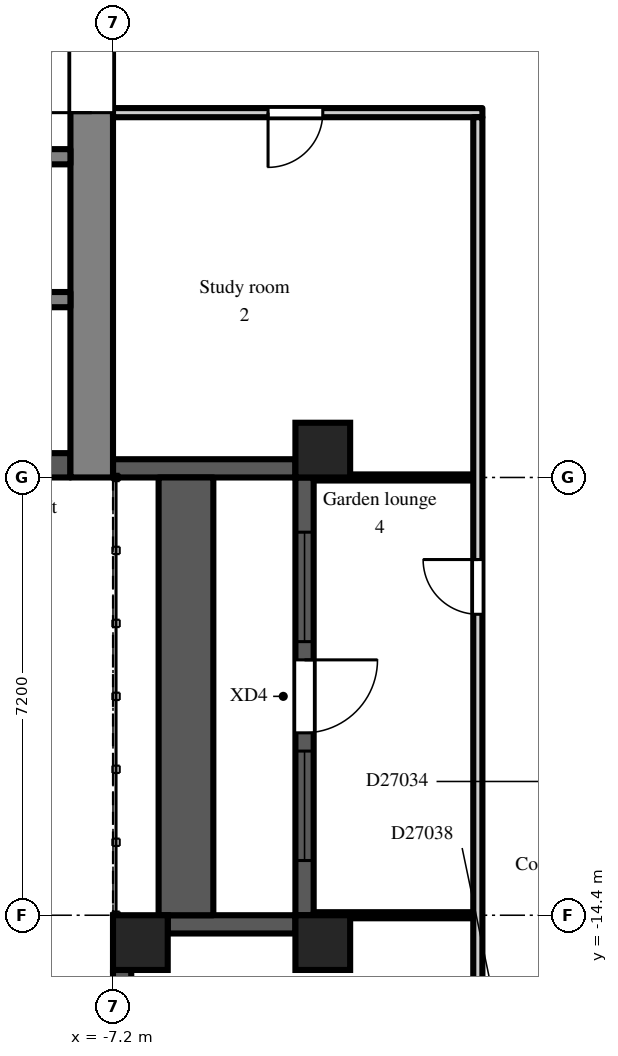
"""IFC4 building model, lengths in metres.
Left out: names, types, materials, properties, quantities, classifications, styles, units other than length and angle.
Written with IfcOpenShell. Run it as: python <this file> out.ifc"""

import sys

from ifc_helpers import new_model, si_unit, direction, frame, frame_2d, origin, origin_2d, place, context, subcontext, project, spatial, rectangle, extrude, element, fill, save


model = new_model("IFC4")
c1 = context("Model", 3, precision=1e-05, world=origin(), true_north=direction((0.0, 1.0)))
c2 = subcontext(c1, "Body", "Model", "MODEL_VIEW")
j1 = project(units=[si_unit("LENGTHUNIT", "METRE"), si_unit("PLANEANGLEUNIT", "RADIAN")], contexts=[c1])
p1 = place(None, origin())
s1 = spatial("IfcSite", under=j1, at=p1, CompositionType="ELEMENT")
p2 = place(p1, origin())
s2 = spatial("IfcBuilding", under=s1, at=p2, CompositionType="ELEMENT")
p3 = place(p2, frame((0.0, 0.0, 188.7)))
s3 = spatial("IfcBuildingStorey", under=s2, at=p3, CompositionType="ELEMENT", Elevation=188.7)
for number, where, z_axis, x_axis in (
    (1, (-6.75, -14.85, 0.0), (0.0, 0.0, 1.0), (1.0, 0.0, 0.0)),
    (2, (-3.75, -14.85, 0.0), (0.0, 0.0, 1.0), (1.0, 0.0, 0.0)),
    (3, (-3.75, -6.75, 0.0), (0.0, 0.0, 1.0), (1.0, 0.0, 0.0)),
):
    element("IfcColumn", number, at=place(p3, frame(where, z_axis=z_axis, x_axis=x_axis)), inside=s3, PredefinedType="COLUMN", context=c2, shape_type="SweptSolid", body=[
        extrude(rectangle(XDim=0.9, YDim=0.9, at=origin_2d()), origin(), (0.0, 0.0, 1.0), 3.0),
    ])
p4 = place(p3, frame((-7.2, -7.05, 0.0), z_axis=(0.0, 0.0, 1.0), x_axis=(1.0, 0.0, 0.0)))
e4 = element("IfcWall", 4, at=p4, inside=s3, PredefinedType="SOLIDWALL", context=c2, shape_type="SweptSolid", body=[
    extrude(rectangle(XDim=3.0, YDim=0.3, at=frame_2d((1.5, 0.0))), origin(), (0.0, 0.0, 1.0), 2.2),
])
p5 = place(p3, frame((-4.05, -7.2, 0.0), z_axis=(0.0, 0.0, 1.0), x_axis=(0.0, -1.0, 0.0)))
e5 = element("IfcWall", 5, at=p5, inside=s3, PredefinedType="SOLIDWALL", context=c2, shape_type="SweptSolid", body=[
    extrude(rectangle(XDim=7.2, YDim=0.3, at=frame_2d((3.6, 0.0))), origin(), (0.0, 0.0, 1.0), 2.2),
])
p6 = place(p5, frame((3.0, 0.0, 0.0)))
e6 = element("IfcOpeningElement", 6, at=p6, cuts=e5, PredefinedType="OPENING", context=c2, shape_type="SweptSolid", body=[
    extrude(rectangle(XDim=1.2, YDim=2.05, at=frame_2d((0.6, 1.025))), frame((0.0, 0.16, 0.0), z_axis=(0.0, -1.0, 0.0), x_axis=(1.0, 0.0, 0.0)), (0.0, 0.0, 1.0), 0.32),
])
p7 = place(p5, frame((0.9, 0.0, 0.2)))
e7 = element("IfcOpeningElement", 7, at=p7, cuts=e5, PredefinedType="OPENING", context=c2, shape_type="SweptSolid", body=[
    extrude(rectangle(XDim=1.8, YDim=1.85, at=frame_2d((0.9, 0.925))), frame((0.0, 0.16, 0.0), z_axis=(0.0, -1.0, 0.0), x_axis=(1.0, 0.0, 0.0)), (0.0, 0.0, 1.0), 0.32),
])
p8 = place(p5, frame((4.5, 0.0, 0.2)))
e8 = element("IfcOpeningElement", 8, at=p8, cuts=e5, PredefinedType="OPENING", context=c2, shape_type="SweptSolid", body=[
    extrude(rectangle(XDim=1.8, YDim=1.85, at=frame_2d((0.9, 0.925))), frame((0.0, 0.16, 0.0), z_axis=(0.0, -1.0, 0.0), x_axis=(1.0, 0.0, 0.0)), (0.0, 0.0, 1.0), 0.32),
])
p9 = place(p3, frame((-4.2, -14.55, 0.0), z_axis=(0.0, 0.0, 1.0), x_axis=(-1.0, 0.0, 0.0)))
e9 = element("IfcWall", 9, at=p9, inside=s3, PredefinedType="SOLIDWALL", context=c2, shape_type="SweptSolid", body=[
    extrude(rectangle(XDim=2.1, YDim=0.3, at=frame_2d((1.05, 0.0))), origin(), (0.0, 0.0, 1.0), 2.2),
])
p10 = place(p3, frame((-7.05, -15.3, 0.0), z_axis=(0.0, 0.0, 1.0), x_axis=(0.0, -1.0, 0.0)))
e10 = element("IfcWall", 10, at=p10, inside=s3, PredefinedType="SOLIDWALL", context=c2, shape_type="SweptSolid", body=[
    extrude(rectangle(XDim=1.8, YDim=0.3, at=frame_2d((0.9, 0.0))), origin(), (0.0, 0.0, 1.0), 2.2),
])
p11 = place(p10, frame((0.3, 0.0, 0.2)))
e11 = element("IfcOpeningElement", 11, at=p11, cuts=e10, PredefinedType="OPENING", context=c2, shape_type="SweptSolid", body=[
    extrude(rectangle(XDim=1.2, YDim=1.85, at=frame_2d((0.6, 0.925))), frame((0.0, 0.16, 0.0), z_axis=(0.0, -1.0, 0.0), x_axis=(1.0, 0.0, 0.0)), (0.0, 0.0, 1.0), 0.32),
])
p12 = place(p3, frame((-6.0, -14.4, 0.0), z_axis=(0.0, 0.0, 1.0), x_axis=(0.0, 1.0, 0.0)))
e12 = element("IfcWall", 12, at=p12, inside=s3, PredefinedType="PARAPET", context=c2, shape_type="SweptSolid", body=[
    extrude(rectangle(XDim=7.2, YDim=0.9, at=frame_2d((3.6, 0.0))), origin(), (0.0, 0.0, 1.0), 0.8),
])
p13 = place(p3, frame((-7.55, -7.2, 0.0), z_axis=(0.0, 0.0, 1.0), x_axis=(0.0, 1.0, 0.0)))
e13 = element("IfcWall", 13, at=p13, inside=s3, PredefinedType="SHEAR", context=c2, shape_type="SweptSolid", body=[
    extrude(rectangle(XDim=14.4, YDim=0.7, at=frame_2d((7.2, 0.0))), origin(), (0.0, 0.0, 1.0), 2.6),
])
p14 = place(p13, frame((6.0, 0.0, 0.0)))
e14 = element("IfcOpeningElement", 14, at=p14, cuts=e13, PredefinedType="OPENING", context=c2, shape_type="SweptSolid", body=[
    extrude(rectangle(XDim=2.4, YDim=2.2, at=frame_2d((1.2, 1.1))), frame((0.0, 0.36, 0.0), z_axis=(0.0, -1.0, 0.0), x_axis=(1.0, 0.0, 0.0)), (0.0, 0.0, 1.0), 0.72),
])
p15 = place(p3, frame((-7.9, -7.0, 0.0), z_axis=(0.0, 0.0, 1.0), x_axis=(-1.0, 0.0, 0.0)))
e15 = element("IfcWall", 15, at=p15, inside=s3, PredefinedType="SHEAR", context=c2, shape_type="SweptSolid", body=[
    extrude(rectangle(XDim=12.95, YDim=0.4, at=frame_2d((6.475, 0.0))), origin(), (0.0, 0.0, 1.0), 2.6),
])
p16 = place(p3, frame((-7.9, -1.925, 0.0), z_axis=(0.0, 0.0, 1.0), x_axis=(-1.0, 0.0, 0.0)))
e16 = element("IfcWall", 16, at=p16, inside=s3, PredefinedType="SHEAR", context=c2, shape_type="SweptSolid", body=[
    extrude(rectangle(XDim=12.95, YDim=0.25, at=frame_2d((6.475, 0.0))), origin(), (0.0, 0.0, 1.0), 2.6),
])
p17 = place(p16, frame((0.525, 0.0, 0.0)))
e17 = element("IfcOpeningElement", 17, at=p17, cuts=e16, PredefinedType="OPENING", context=c2, shape_type="SweptSolid", body=[
    extrude(rectangle(XDim=0.9, YDim=2.1, at=frame_2d((0.45, 1.05))), frame((0.0, 0.135, 0.0), z_axis=(0.0, -1.0, 0.0), x_axis=(1.0, 0.0, 0.0)), (0.0, 0.0, 1.0), 0.27),
])
p18 = place(p16, frame((2.625, 0.0, 0.0)))
e18 = element("IfcOpeningElement", 18, at=p18, cuts=e16, PredefinedType="OPENING", context=c2, shape_type="SweptSolid", body=[
    extrude(rectangle(XDim=1.1, YDim=2.1, at=frame_2d((0.55, 1.05))), frame((0.0, 0.135, 0.0), z_axis=(0.0, -1.0, 0.0), x_axis=(1.0, 0.0, 0.0)), (0.0, 0.0, 1.0), 0.27),
])
p19 = place(p16, frame((8.225, 0.0, 0.0)))
e19 = element("IfcOpeningElement", 19, at=p19, cuts=e16, PredefinedType="OPENING", context=c2, shape_type="SweptSolid", body=[
    extrude(rectangle(XDim=0.9, YDim=2.1, at=frame_2d((0.45, 1.05))), frame((0.0, 0.135, 0.0), z_axis=(0.0, -1.0, 0.0), x_axis=(1.0, 0.0, 0.0)), (0.0, 0.0, 1.0), 0.27),
])
p20 = place(p3, frame((-7.9, -4.275, 0.0), z_axis=(0.0, 0.0, 1.0), x_axis=(-1.0, 0.0, 0.0)))
e20 = element("IfcWall", 20, at=p20, inside=s3, PredefinedType="SHEAR", context=c2, shape_type="SweptSolid", body=[
    extrude(rectangle(XDim=1.95, YDim=0.25, at=frame_2d((0.975, 0.0))), origin(), (0.0, 0.0, 1.0), 2.6),
])
p21 = place(p3, frame((-7.2, -1.2, 0.0), z_axis=(0.0, 0.0, 1.0), x_axis=(1.0, 0.0, 0.0)))
e21 = element("IfcWall", 21, at=p21, inside=s3, PredefinedType="PARTITIONING", context=c2, shape_type="SweptSolid", body=[
    extrude(rectangle(XDim=6.075, YDim=0.15, at=frame_2d((3.038, 0.0))), origin(), (0.0, 0.0, 1.0), 2.6),
])
p22 = place(p21, frame((2.55, 0.0, 0.0)))
e22 = element("IfcOpeningElement", 22, at=p22, cuts=e21, PredefinedType="OPENING", context=c2, shape_type="SweptSolid", body=[
    extrude(rectangle(XDim=0.9, YDim=2.1, at=frame_2d((0.45, 1.05))), frame((0.0, 0.085, 0.0), z_axis=(0.0, -1.0, 0.0), x_axis=(1.0, 0.0, 0.0)), (0.0, 0.0, 1.0), 0.17),
])
for number, where, z_axis, x_axis in (
    (23, (-3.9, -14.4, 0.0), (0.0, 0.0, 1.0), (1.0, 0.0, 0.0)),
    (24, (-3.9, -7.2, 0.0), (0.0, 0.0, 1.0), (1.0, 0.0, 0.0)),
):
    element("IfcWall", number, at=place(p3, frame(where, z_axis=z_axis, x_axis=x_axis)), inside=s3, PredefinedType="PARTITIONING", context=c2, shape_type="SweptSolid", body=[
        extrude(rectangle(XDim=2.625, YDim=0.1, at=frame_2d((1.312, 0.0))), origin(), (0.0, 0.0, 1.0), 2.6),
    ])
p23 = place(p3, frame((-1.2, -19.525, 0.0), z_axis=(0.0, 0.0, 1.0), x_axis=(0.0, 1.0, 0.0)))
e25 = element("IfcWall", 25, at=p23, inside=s3, PredefinedType="PARTITIONING", context=c2, shape_type="SweptSolid", body=[
    extrude(rectangle(XDim=18.25, YDim=0.15, at=frame_2d((9.125, 0.0))), origin(), (0.0, 0.0, 1.0), 2.6),
])
p24 = place(p23, frame((10.075, 0.0, 0.0)))
e26 = element("IfcOpeningElement", 26, at=p24, cuts=e25, PredefinedType="OPENING", context=c2, shape_type="SweptSolid", body=[
    extrude(rectangle(XDim=0.9, YDim=2.1, at=frame_2d((0.45, 1.05))), frame((0.0, 0.085, 0.0), z_axis=(0.0, -1.0, 0.0), x_axis=(1.0, 0.0, 0.0)), (0.0, 0.0, 1.0), 0.17),
])
p25 = place(p23, frame((2.875, 0.0, 0.0)))
e27 = element("IfcOpeningElement", 27, at=p25, cuts=e25, PredefinedType="OPENING", context=c2, shape_type="SweptSolid", body=[
    extrude(rectangle(XDim=0.9, YDim=2.1, at=frame_2d((0.45, 1.05))), frame((0.0, 0.085, 0.0), z_axis=(0.0, -1.0, 0.0), x_axis=(1.0, 0.0, 0.0)), (0.0, 0.0, 1.0), 0.17),
])
p26 = place(p23, frame((0.275, 0.0, 0.0)))
e28 = element("IfcOpeningElement", 28, at=p26, cuts=e25, PredefinedType="OPENING", context=c2, shape_type="SweptSolid", body=[
    extrude(rectangle(XDim=0.9, YDim=2.1, at=frame_2d((0.45, 1.05))), frame((0.0, 0.085, 0.0), z_axis=(0.0, -1.0, 0.0), x_axis=(1.0, 0.0, 0.0)), (0.0, 0.0, 1.0), 0.17),
])
p27 = place(p6, origin())
e29 = element("IfcDoor", 29, at=p27, inside=s3, OperationType="SINGLE_SWING_LEFT", PredefinedType="DOOR", context=c2, shape_type="SweptSolid", body=[
    extrude(rectangle(XDim=1.2, YDim=2.05, at=frame_2d((0.6, 1.025))), frame((0.0, 0.025, 0.0), z_axis=(0.0, -1.0, 0.0), x_axis=(1.0, 0.0, 0.0)), (0.0, 0.0, 1.0), 0.05),
])
fill(e6, e29)
p28 = place(p7, origin())
e30 = element("IfcWindow", 30, at=p28, inside=s3, PartitioningType="SINGLE_PANEL", PredefinedType="WINDOW", context=c2, shape_type="SweptSolid", body=[
    extrude(rectangle(XDim=1.8, YDim=1.85, at=frame_2d((0.9, 0.925))), frame((0.0, 0.03, 0.0), z_axis=(0.0, -1.0, 0.0), x_axis=(1.0, 0.0, 0.0)), (0.0, 0.0, 1.0), 0.06),
])
fill(e7, e30)
p29 = place(p8, origin())
e31 = element("IfcWindow", 31, at=p29, inside=s3, PartitioningType="SINGLE_PANEL", PredefinedType="WINDOW", context=c2, shape_type="SweptSolid", body=[
    extrude(rectangle(XDim=1.8, YDim=1.85, at=frame_2d((0.9, 0.925))), frame((0.0, 0.03, 0.0), z_axis=(0.0, -1.0, 0.0), x_axis=(1.0, 0.0, 0.0)), (0.0, 0.0, 1.0), 0.06),
])
fill(e8, e31)
p30 = place(p14, origin())
e32 = element("IfcDoor", 32, at=p30, inside=s3, OperationType="DOUBLE_DOOR_DOUBLE_SWING", PredefinedType="DOOR", context=c2, shape_type="SweptSolid", body=[
    extrude(rectangle(XDim=2.4, YDim=2.2, at=frame_2d((1.2, 1.1))), frame((0.0, 0.025, 0.0), z_axis=(0.0, -1.0, 0.0), x_axis=(1.0, 0.0, 0.0)), (0.0, 0.0, 1.0), 0.05),
])
fill(e14, e32)
p31 = place(p22, frame((0.9, 0.0, 0.0), z_axis=(0.0, 0.0, 1.0), x_axis=(-1.0, 0.0, 0.0)))
e33 = element("IfcDoor", 33, at=p31, inside=s3, OperationType="SINGLE_SWING_RIGHT", PredefinedType="DOOR", context=c2, shape_type="SweptSolid", body=[
    extrude(rectangle(XDim=0.9, YDim=2.1, at=frame_2d((0.45, 1.05))), frame((0.0, 0.025, 0.0), z_axis=(0.0, -1.0, 0.0), x_axis=(1.0, 0.0, 0.0)), (0.0, 0.0, 1.0), 0.05),
])
fill(e22, e33)
p32 = place(p24, origin())
e34 = element("IfcDoor", 34, at=p32, inside=s3, OperationType="SINGLE_SWING_RIGHT", PredefinedType="DOOR", context=c2, shape_type="SweptSolid", body=[
    extrude(rectangle(XDim=0.9, YDim=2.1, at=frame_2d((0.45, 1.05))), frame((0.0, 0.025, 0.0), z_axis=(0.0, -1.0, 0.0), x_axis=(1.0, 0.0, 0.0)), (0.0, 0.0, 1.0), 0.05),
])
fill(e26, e34)
save(model, sys.argv[1])
